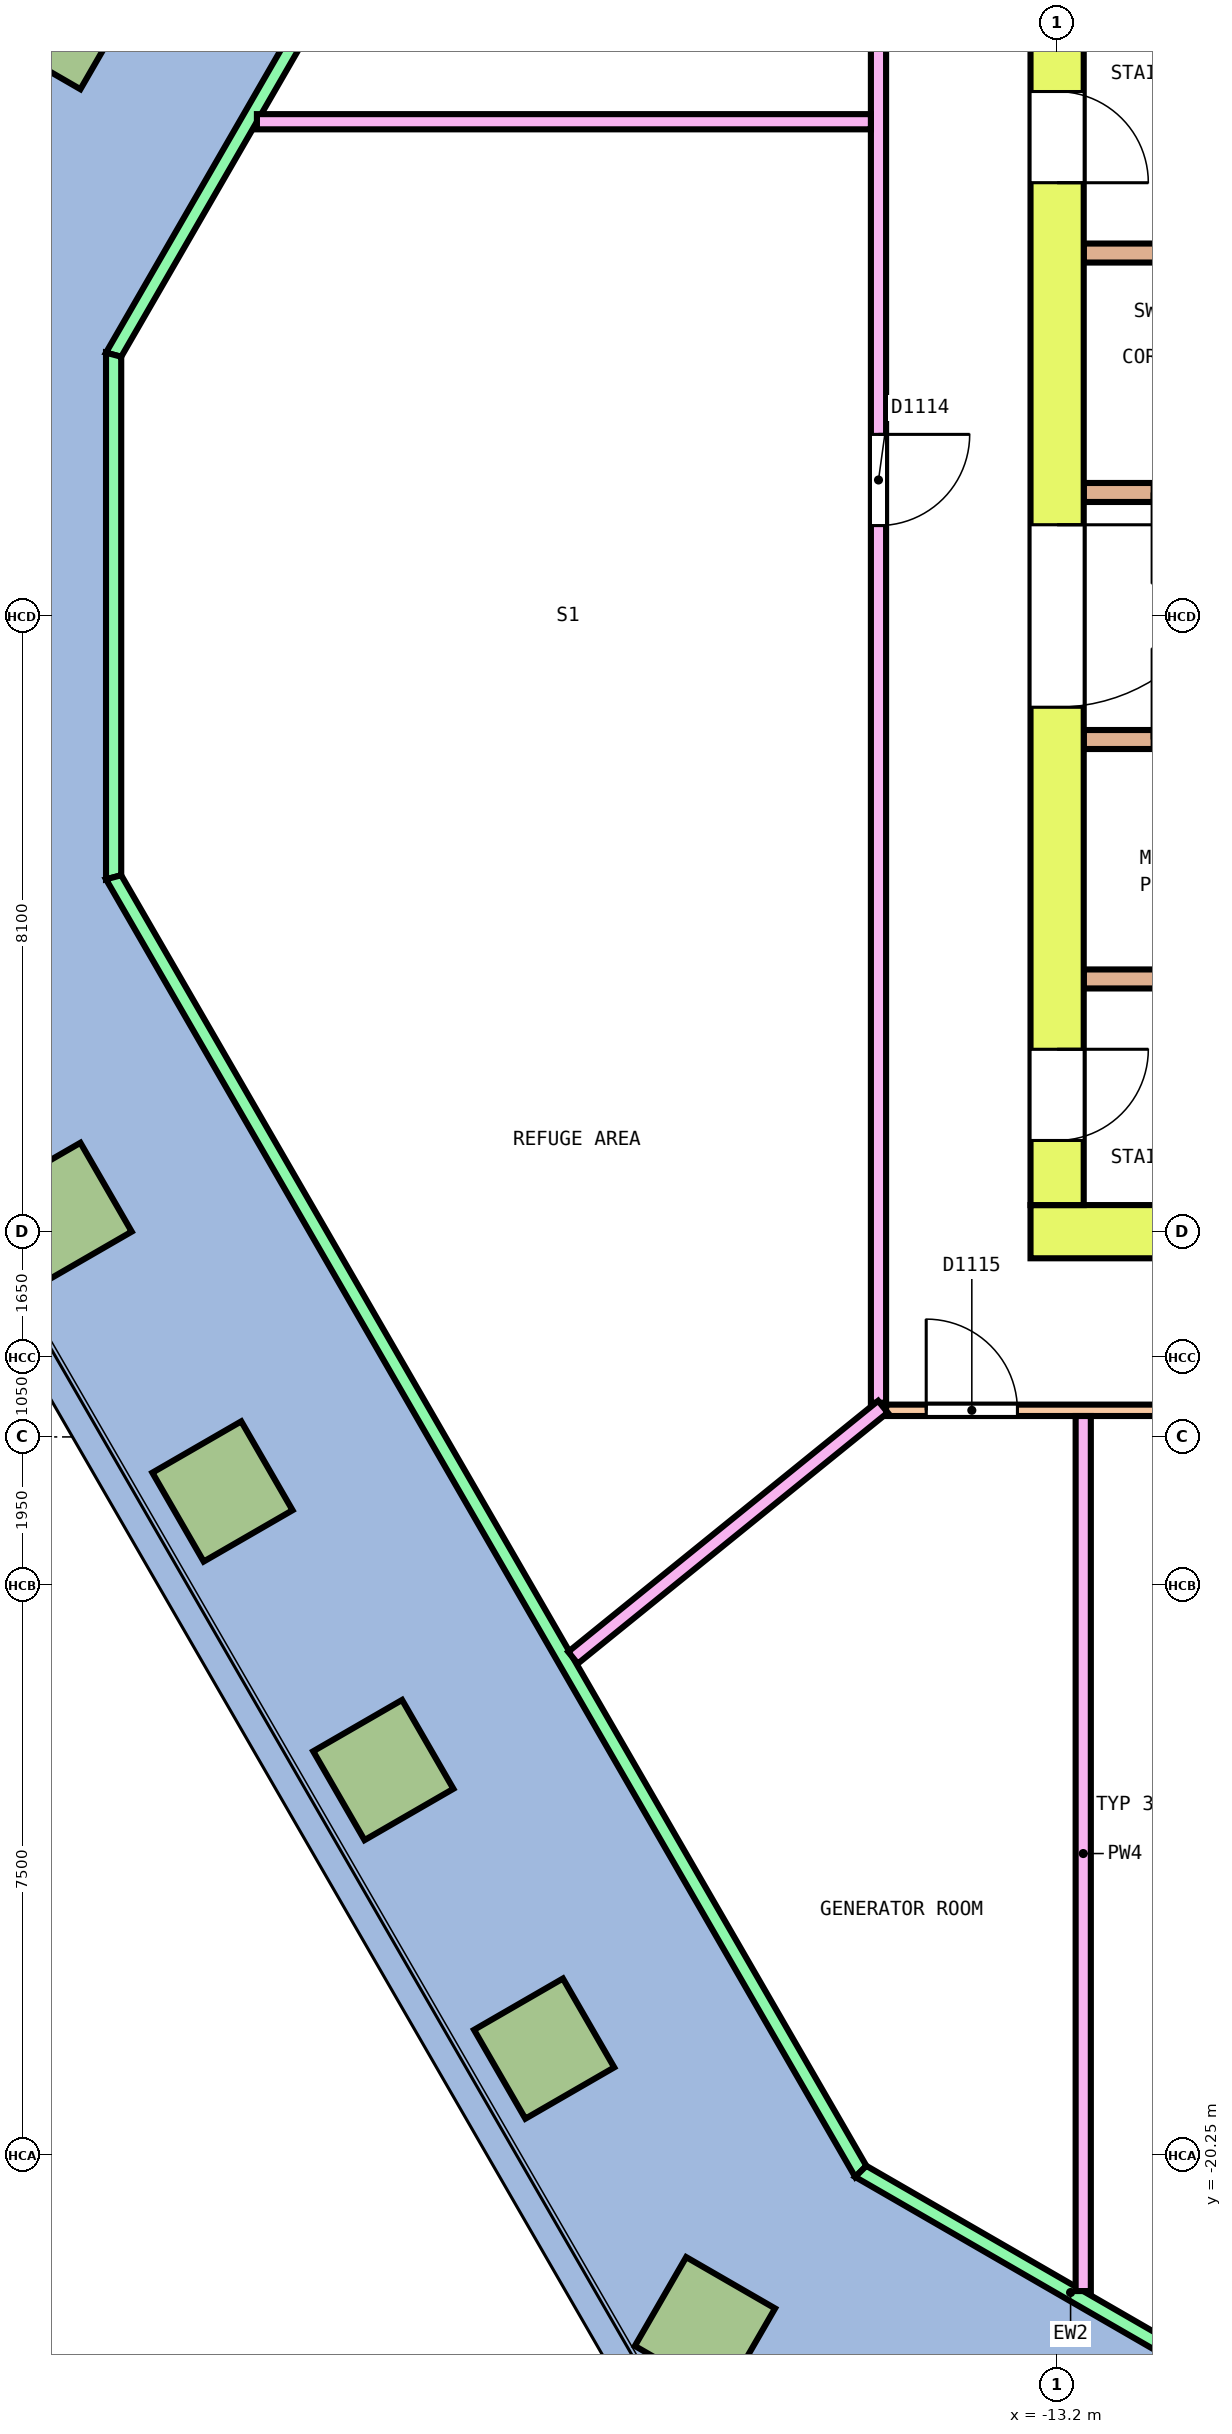
"""IFC4 building model, lengths in metres.
Left out: names, types, materials, properties, quantities, classifications, styles, units other than length and angle.
Written with IfcOpenShell. Run it as: python <this file> out.ifc"""

import sys

from ifc_helpers import new_model, si_unit, direction, frame, frame_2d, origin, origin_2d, place, context, subcontext, project, spatial, polyline, rectangle, outline, extrude, element, fill, save


model = new_model("IFC4")
c1 = context("Model", 3, precision=1e-05, world=origin(), true_north=direction((0.0, 1.0)))
c2 = subcontext(c1, "Body", "Model", "MODEL_VIEW")
j1 = project(units=[si_unit("LENGTHUNIT", "METRE"), si_unit("PLANEANGLEUNIT", "RADIAN")], contexts=[c1])
p1 = place(None, origin())
s1 = spatial("IfcSite", under=j1, at=p1, CompositionType="ELEMENT")
p2 = place(p1, origin())
s2 = spatial("IfcBuilding", under=s1, at=p2, CompositionType="ELEMENT")
p3 = place(p2, frame((0.0, 0.0, 139.6)))
s3 = spatial("IfcBuildingStorey", under=s2, at=p3, CompositionType="ELEMENT", Elevation=139.6)
for number, where, z_axis, x_axis in (
    (1, (-26.297, 7.853, 0.0), (0.0, 0.0, 1.0), (-0.5, -0.866, 0.0)),
    (2, (-26.297, -7.853, 0.0), (0.0, 0.0, 1.0), (0.5, -0.866, 0.0)),
    (3, (-24.181, -11.518, 0.0), (0.0, 0.0, 1.0), (0.5, -0.866, 0.0)),
    (4, (-22.065, -15.183, 0.0), (0.0, 0.0, 1.0), (0.5, -0.866, 0.0)),
    (5, (-19.949, -18.847, 0.0), (0.0, 0.0, 1.0), (0.5, -0.866, 0.0)),
    (6, (-17.833, -22.512, 0.0), (0.0, 0.0, 1.0), (0.866, -0.5, 0.0)),
):
    element("IfcColumn", number, at=place(p3, frame(where, z_axis=z_axis, x_axis=x_axis)), inside=s3, PredefinedType="COLUMN", context=c2, shape_type="SweptSolid", body=[
        extrude(rectangle(XDim=1.35, YDim=1.35, at=origin_2d()), origin(), (0.0, 0.0, 1.0), 5.25),
    ])
p4 = place(p3, frame((-15.783, 20.463, 0.0), z_axis=(0.0, 0.0, 1.0), x_axis=(-0.499999083763, -0.866025932773, 0.0)))
e7 = element("IfcWall", 7, at=p4, inside=s3, PredefinedType="SOLIDWALL", context=c2, shape_type="SweptSolid", body=[
    extrude(outline(polyline([(-0.027, -0.1), (19.686, -0.1), (19.632, 0.1), (0.027, 0.1), (-0.027, -0.1)])), origin(), (0.0, 0.0, 1.0), 4.55),
])
p5 = place(p3, frame((-25.613, 3.437, 0.0), z_axis=(0.0, 0.0, 1.0), x_axis=(0.0, -1.0, 0.0)))
e8 = element("IfcWall", 8, at=p5, inside=s3, PredefinedType="SOLIDWALL", context=c2, shape_type="SweptSolid", body=[
    extrude(outline(polyline([(-0.027, -0.1), (6.901, -0.1), (6.848, 0.1), (0.027, 0.1), (-0.027, -0.1)])), origin(), (0.0, 0.0, 1.0), 4.55),
])
p6 = place(p3, frame((-25.613, -3.437, 0.0), z_axis=(0.0, 0.0, 1.0), x_axis=(0.499999083763, -0.866025932773, 0.0)))
e9 = element("IfcWall", 9, at=p6, inside=s3, PredefinedType="SOLIDWALL", context=c2, shape_type="SweptSolid", body=[
    extrude(outline(polyline([(-0.027, -0.1), (19.686, -0.1), (19.632, 0.1), (0.027, 0.1), (-0.027, -0.1)])), origin(), (0.0, 0.0, 1.0), 4.55),
])
p7 = place(p3, frame((-15.783, -20.463, 0.0), z_axis=(0.0, 0.0, 1.0), x_axis=(0.866026138243, -0.499998727878, 0.0)))
e10 = element("IfcWall", 10, at=p7, inside=s3, PredefinedType="SOLIDWALL", context=c2, shape_type="SweptSolid", body=[
    extrude(outline(polyline([(-0.027, -0.1), (6.401, -0.1), (6.348, 0.1), (0.027, 0.1), (-0.027, -0.1)])), origin(), (0.0, 0.0, 1.0), 4.55),
])
p8 = place(p3, frame((-13.55, -8.1, 0.0), z_axis=(0.0, 0.0, 1.0), x_axis=(1.0, 0.0, 0.0)))
e11 = element("IfcWall", 11, at=p8, inside=s3, PredefinedType="SHEAR", context=c2, shape_type="SweptSolid", body=[
    extrude(rectangle(XDim=27.1, YDim=0.7, at=frame_2d((13.55, 0.0))), origin(), (0.0, 0.0, 1.0), 5.3),
])
p9 = place(p8, frame((15.1, 0.0, 0.0)))
e12 = element("IfcOpeningElement", 12, at=p9, cuts=e11, PredefinedType="OPENING", context=c2, shape_type="SweptSolid", body=[
    extrude(rectangle(XDim=1.2, YDim=2.1, at=frame_2d((0.6, 1.05))), frame((0.0, 0.36, 0.0), z_axis=(0.0, -1.0, 0.0), x_axis=(1.0, 0.0, 0.0)), (0.0, 0.0, 1.0), 0.72),
])
p10 = place(p3, frame((-13.2, -7.75, 0.0), z_axis=(0.0, 0.0, 1.0), x_axis=(0.0, 1.0, 0.0)))
e13 = element("IfcWall", 13, at=p10, inside=s3, PredefinedType="SHEAR", context=c2, shape_type="SweptSolid", body=[
    extrude(rectangle(XDim=15.5, YDim=0.7, at=frame_2d((7.75, 0.0))), origin(), (0.0, 0.0, 1.0), 5.3),
])
p11 = place(p10, frame((6.55, 0.0, 0.0)))
e14 = element("IfcOpeningElement", 14, at=p11, cuts=e13, PredefinedType="OPENING", context=c2, shape_type="SweptSolid", body=[
    extrude(rectangle(XDim=2.4, YDim=2.1, at=frame_2d((1.2, 1.05))), frame((0.0, 0.36, 0.0), z_axis=(0.0, -1.0, 0.0), x_axis=(1.0, 0.0, 0.0)), (0.0, 0.0, 1.0), 0.72),
])
p12 = place(p10, frame((13.45, 0.0, 0.0)))
e15 = element("IfcOpeningElement", 15, at=p12, cuts=e13, PredefinedType="OPENING", context=c2, shape_type="SweptSolid", body=[
    extrude(rectangle(XDim=1.2, YDim=2.1, at=frame_2d((0.6, 1.05))), frame((0.0, 0.36, 0.0), z_axis=(0.0, -1.0, 0.0), x_axis=(1.0, 0.0, 0.0)), (0.0, 0.0, 1.0), 0.72),
])
p13 = place(p10, frame((0.85, 0.0, 0.0)))
e16 = element("IfcOpeningElement", 16, at=p13, cuts=e13, PredefinedType="OPENING", context=c2, shape_type="SweptSolid", body=[
    extrude(rectangle(XDim=1.2, YDim=2.1, at=frame_2d((0.6, 1.05))), frame((0.0, 0.36, 0.0), z_axis=(0.0, -1.0, 0.0), x_axis=(1.0, 0.0, 0.0)), (0.0, 0.0, 1.0), 0.72),
])
p14 = place(p3, frame((-12.85, 1.625, 0.0), z_axis=(0.0, 0.0, 1.0), x_axis=(1.0, 0.0, 0.0)))
e17 = element("IfcWall", 17, at=p14, inside=s3, PredefinedType="SOLIDWALL", context=c2, shape_type="SweptSolid", body=[
    extrude(rectangle(XDim=3.0, YDim=0.25, at=frame_2d((1.5, 0.0))), origin(), (0.0, 0.0, 1.0), 5.3),
])
p15 = place(p14, frame((0.9, 0.0, 0.0)))
e18 = element("IfcOpeningElement", 18, at=p15, cuts=e17, PredefinedType="OPENING", context=c2, shape_type="SweptSolid", body=[
    extrude(rectangle(XDim=1.2, YDim=2.1, at=frame_2d((0.6, 1.05))), frame((0.0, 0.135, 0.0), z_axis=(0.0, -1.0, 0.0), x_axis=(1.0, 0.0, 0.0)), (0.0, 0.0, 1.0), 0.27),
])
p16 = place(p3, frame((-12.85, 4.775, 0.0), z_axis=(0.0, 0.0, 1.0), x_axis=(1.0, 0.0, 0.0)))
e19 = element("IfcWall", 19, at=p16, inside=s3, PredefinedType="SOLIDWALL", context=c2, shape_type="SweptSolid", body=[
    extrude(rectangle(XDim=3.0, YDim=0.25, at=frame_2d((1.5, 0.0))), origin(), (0.0, 0.0, 1.0), 5.3),
])
p17 = place(p3, frame((-12.85, -1.625, 0.0), z_axis=(0.0, 0.0, 1.0), x_axis=(1.0, 0.0, 0.0)))
e20 = element("IfcWall", 20, at=p17, inside=s3, PredefinedType="SOLIDWALL", context=c2, shape_type="SweptSolid", body=[
    extrude(rectangle(XDim=3.0, YDim=0.25, at=frame_2d((1.5, 0.0))), origin(), (0.0, 0.0, 1.0), 5.3),
])
p18 = place(p17, frame((0.9, 0.0, 0.0)))
e21 = element("IfcOpeningElement", 21, at=p18, cuts=e20, PredefinedType="OPENING", context=c2, shape_type="SweptSolid", body=[
    extrude(rectangle(XDim=1.2, YDim=2.1, at=frame_2d((0.6, 1.05))), frame((0.0, 0.135, 0.0), z_axis=(0.0, -1.0, 0.0), x_axis=(1.0, 0.0, 0.0)), (0.0, 0.0, 1.0), 0.27),
])
p19 = place(p3, frame((-12.85, -4.775, 0.0), z_axis=(0.0, 0.0, 1.0), x_axis=(1.0, 0.0, 0.0)))
e22 = element("IfcWall", 22, at=p19, inside=s3, PredefinedType="SOLIDWALL", context=c2, shape_type="SweptSolid", body=[
    extrude(rectangle(XDim=3.0, YDim=0.25, at=frame_2d((1.5, 0.0))), origin(), (0.0, 0.0, 1.0), 5.3),
])
p20 = place(p3, frame((-15.45, -10.45, 0.0), z_axis=(0.0, 0.0, 1.0), x_axis=(1.0, 0.0, 0.0)))
e23 = element("IfcWall", 23, at=p20, inside=s3, PredefinedType="PARTITIONING", context=c2, shape_type="SweptSolid", body=[
    extrude(rectangle(XDim=13.234, YDim=0.15, at=frame_2d((6.617, 0.0))), origin(), (0.0, 0.0, 1.0), 4.25),
])
p21 = place(p20, frame((0.528, 0.0, 0.0)))
e24 = element("IfcOpeningElement", 24, at=p21, cuts=e23, PredefinedType="OPENING", context=c2, shape_type="SweptSolid", body=[
    extrude(rectangle(XDim=1.2, YDim=2.1, at=frame_2d((0.6, 1.05))), frame((0.0, 0.085, 0.0), z_axis=(0.0, -1.0, 0.0), x_axis=(1.0, 0.0, 0.0)), (0.0, 0.0, 1.0), 0.17),
])
p22 = place(p20, frame((8.69, 0.0, 0.0)))
e25 = element("IfcOpeningElement", 25, at=p22, cuts=e23, PredefinedType="OPENING", context=c2, shape_type="SweptSolid", body=[
    extrude(rectangle(XDim=1.2, YDim=2.1, at=frame_2d((0.6, 1.05))), frame((0.0, 0.085, 0.0), z_axis=(0.0, -1.0, 0.0), x_axis=(1.0, 0.0, 0.0)), (0.0, 0.0, 1.0), 0.17),
])
p23 = place(p3, frame((-15.55, -10.35, 0.0), z_axis=(0.0, 0.0, 1.0), x_axis=(0.0, 1.0, 0.0)))
e26 = element("IfcWall", 26, at=p23, inside=s3, PredefinedType="PARTITIONING", context=c2, shape_type="SweptSolid", body=[
    extrude(rectangle(XDim=20.9, YDim=0.2, at=frame_2d((10.45, 0.0))), origin(), (0.0, 0.0, 1.0), 4.25),
])
p24 = place(p23, frame((18.226, 0.0, 0.0)))
e27 = element("IfcOpeningElement", 27, at=p24, cuts=e26, PredefinedType="OPENING", context=c2, shape_type="SweptSolid", body=[
    extrude(rectangle(XDim=1.2, YDim=2.1, at=frame_2d((0.6, 1.05))), frame((0.0, 0.11, 0.0), z_axis=(0.0, -1.0, 0.0), x_axis=(1.0, 0.0, 0.0)), (0.0, 0.0, 1.0), 0.22),
])
p25 = place(p23, frame((11.539, 0.0, 0.0)))
e28 = element("IfcOpeningElement", 28, at=p25, cuts=e26, PredefinedType="OPENING", context=c2, shape_type="SweptSolid", body=[
    extrude(rectangle(XDim=1.2, YDim=2.1, at=frame_2d((0.6, 1.05))), frame((0.0, 0.11, 0.0), z_axis=(0.0, -1.0, 0.0), x_axis=(1.0, 0.0, 0.0)), (0.0, 0.0, 1.0), 0.22),
])
p26 = place(p3, frame((-12.856, -22.037, 0.0), z_axis=(0.0, 0.0, 1.0), x_axis=(0.0, 1.0, 0.0)))
e29 = element("IfcWall", 29, at=p26, inside=s3, PredefinedType="PARTITIONING", context=c2, shape_type="SweptSolid", body=[
    extrude(rectangle(XDim=11.512, YDim=0.2, at=frame_2d((5.756, 0.0))), origin(), (0.0, 0.0, 1.0), 4.25),
])
p27 = place(p3, frame((-23.728, 6.502, 0.0), z_axis=(0.0, 0.0, 1.0), x_axis=(1.0, 0.0, 0.0)))
e30 = element("IfcWall", 30, at=p27, inside=s3, PredefinedType="PARTITIONING", context=c2, shape_type="SweptSolid", body=[
    extrude(rectangle(XDim=8.078, YDim=0.2, at=frame_2d((4.039, 0.0))), origin(), (0.0, 0.0, 1.0), 4.25),
])
p28 = place(p3, frame((-19.569, -13.705, 0.0), z_axis=(0.0, 0.0, 1.0), x_axis=(0.777123499023, 0.629348128834, 0.0)))
e31 = element("IfcWall", 31, at=p28, inside=s3, PredefinedType="PARTITIONING", context=c2, shape_type="SweptSolid", body=[
    extrude(rectangle(XDim=5.247, YDim=0.2, at=frame_2d((2.624, 0.0))), origin(), (0.0, 0.0, 1.0), 4.25),
])
p29 = place(p11, origin())
e32 = element("IfcDoor", 32, at=p29, inside=s3, OperationType="DOUBLE_DOOR_SINGLE_SWING", PredefinedType="DOOR", context=c2, shape_type="SweptSolid", body=[
    extrude(rectangle(XDim=2.4, YDim=2.1, at=frame_2d((1.2, 1.05))), frame((0.0, 0.3, 0.0), z_axis=(0.0, -1.0, 0.0), x_axis=(1.0, 0.0, 0.0)), (0.0, 0.0, 1.0), 0.6),
])
fill(e14, e32)
p30 = place(p12, origin())
e33 = element("IfcDoor", 33, at=p30, inside=s3, OperationType="SINGLE_SWING_LEFT", PredefinedType="DOOR", context=c2, shape_type="SweptSolid", body=[
    extrude(rectangle(XDim=1.2, YDim=2.1, at=frame_2d((0.6, 1.05))), frame((0.0, 0.3, 0.0), z_axis=(0.0, -1.0, 0.0), x_axis=(1.0, 0.0, 0.0)), (0.0, 0.0, 1.0), 0.6),
])
fill(e15, e33)
p31 = place(p13, origin())
e34 = element("IfcDoor", 34, at=p31, inside=s3, OperationType="SINGLE_SWING_LEFT", PredefinedType="DOOR", context=c2, shape_type="SweptSolid", body=[
    extrude(rectangle(XDim=1.2, YDim=2.1, at=frame_2d((0.6, 1.05))), frame((0.0, 0.3, 0.0), z_axis=(0.0, -1.0, 0.0), x_axis=(1.0, 0.0, 0.0)), (0.0, 0.0, 1.0), 0.6),
])
fill(e16, e34)
p32 = place(p15, origin())
e35 = element("IfcDoor", 35, at=p32, inside=s3, OperationType="SINGLE_SWING_RIGHT", PredefinedType="DOOR", context=c2, shape_type="SweptSolid", body=[
    extrude(rectangle(XDim=1.2, YDim=2.1, at=frame_2d((0.6, 1.05))), frame((0.0, 0.075, 0.0), z_axis=(0.0, -1.0, 0.0), x_axis=(1.0, 0.0, 0.0)), (0.0, 0.0, 1.0), 0.15),
])
fill(e18, e35)
p33 = place(p18, origin())
e36 = element("IfcDoor", 36, at=p33, inside=s3, OperationType="SINGLE_SWING_RIGHT", PredefinedType="DOOR", context=c2, shape_type="SweptSolid", body=[
    extrude(rectangle(XDim=1.2, YDim=2.1, at=frame_2d((0.6, 1.05))), frame((0.0, 0.075, 0.0), z_axis=(0.0, -1.0, 0.0), x_axis=(1.0, 0.0, 0.0)), (0.0, 0.0, 1.0), 0.15),
])
fill(e21, e36)
p34 = place(p25, origin())
e37 = element("IfcDoor", 37, at=p34, inside=s3, OperationType="DOUBLE_DOOR_SINGLE_SWING", PredefinedType="DOOR", context=c2, shape_type="SweptSolid", body=[
    extrude(rectangle(XDim=1.2, YDim=2.1, at=frame_2d((0.6, 1.05))), frame((0.0, 0.025, 0.0), z_axis=(0.0, -1.0, 0.0), x_axis=(1.0, 0.0, 0.0)), (0.0, 0.0, 1.0), 0.05),
])
fill(e28, e37)
p35 = place(p21, origin())
e38 = element("IfcDoor", 38, at=p35, inside=s3, OperationType="DOUBLE_DOOR_SINGLE_SWING", PredefinedType="DOOR", context=c2, shape_type="SweptSolid", body=[
    extrude(rectangle(XDim=1.2, YDim=2.1, at=frame_2d((0.6, 1.05))), frame((0.0, 0.025, 0.0), z_axis=(0.0, -1.0, 0.0), x_axis=(1.0, 0.0, 0.0)), (0.0, 0.0, 1.0), 0.05),
])
fill(e24, e38)
save(model, sys.argv[1])
